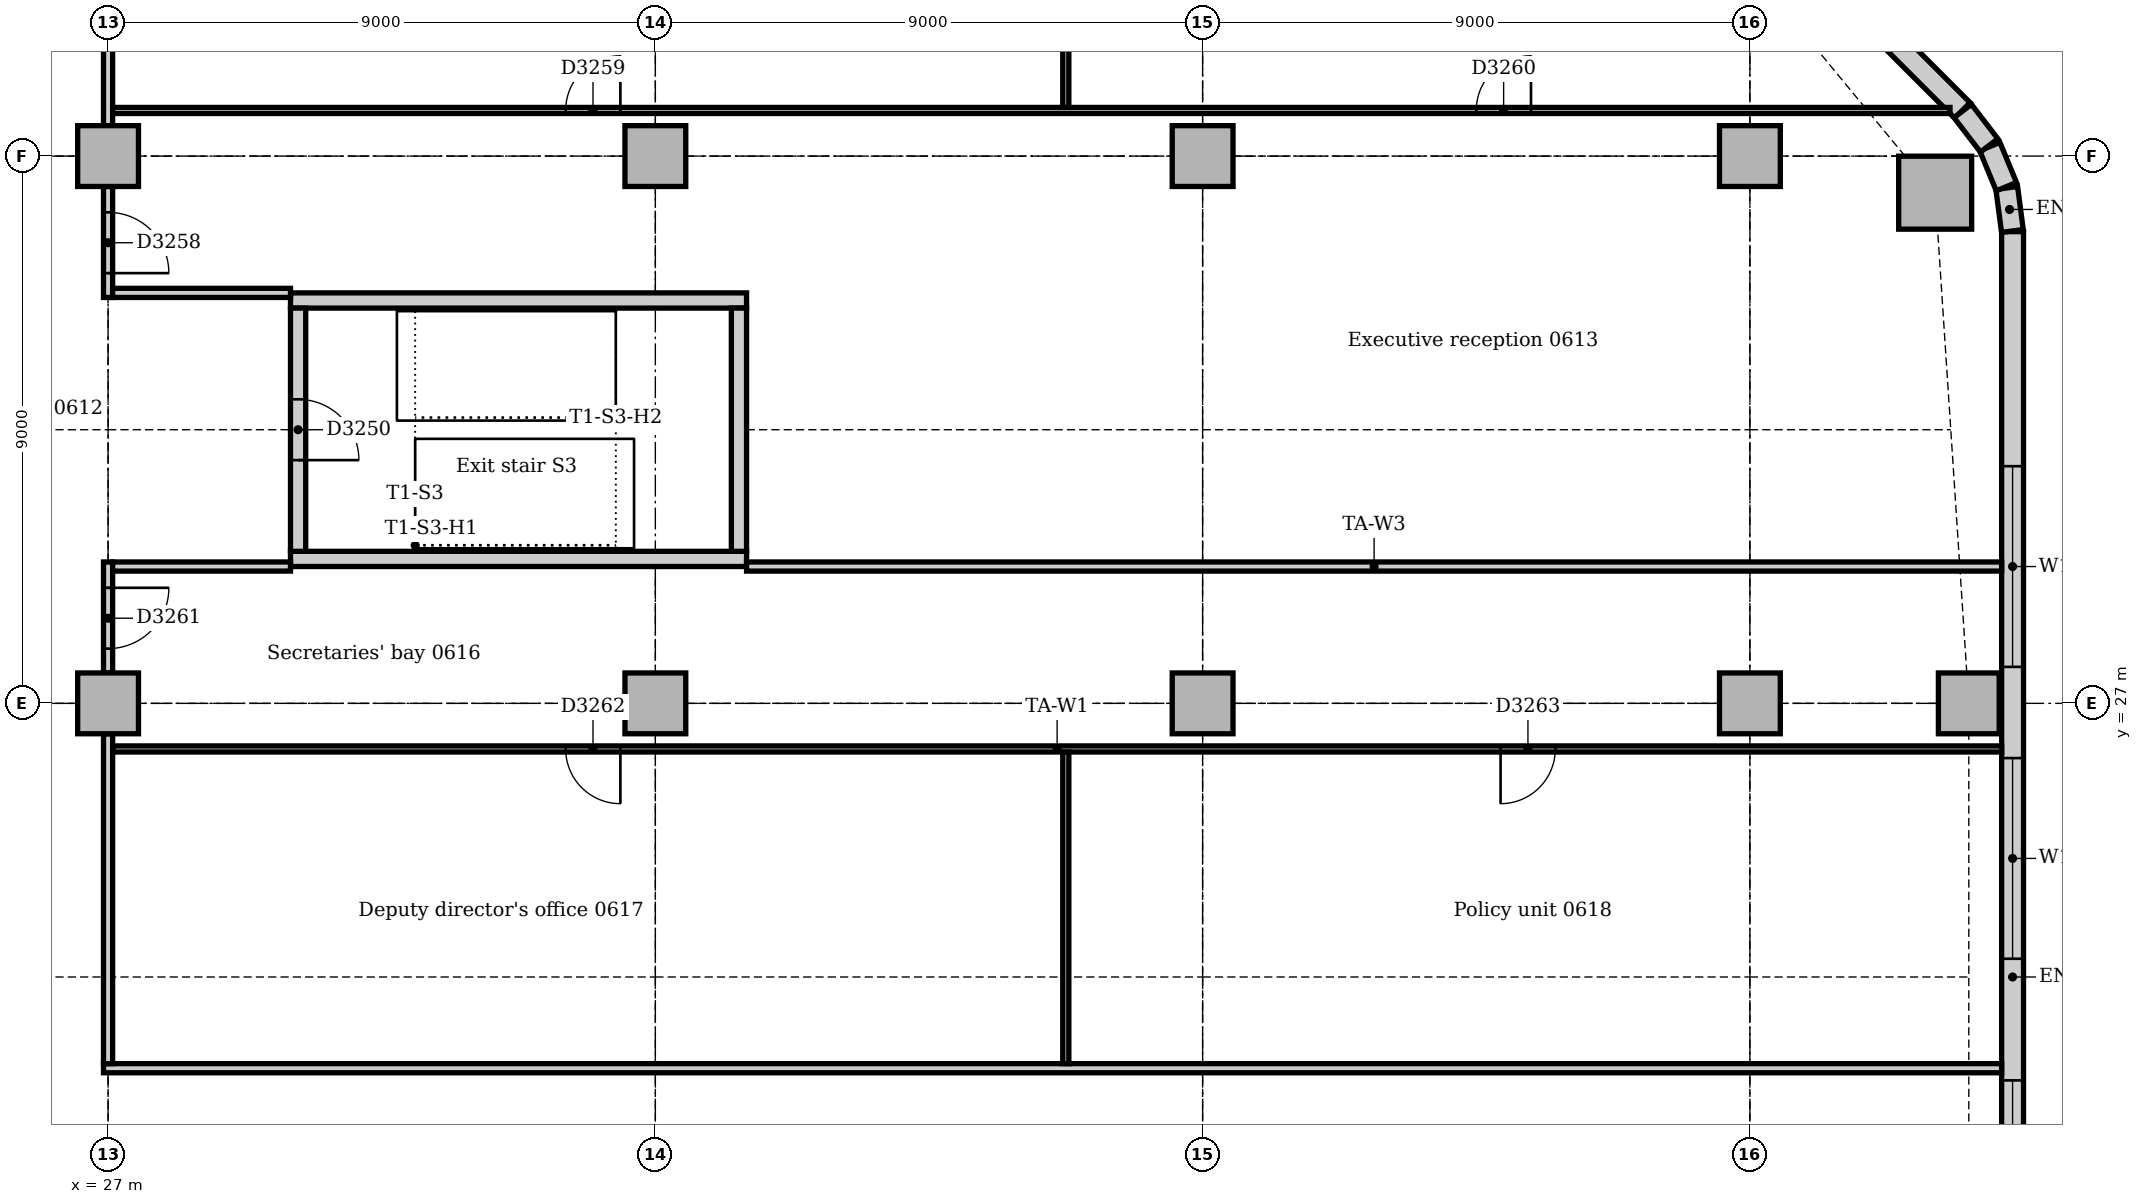
"""IFC4 building model, lengths in metres.
Left out: names, types, materials, properties, quantities, classifications, styles, units other than length and angle.
Written with IfcOpenShell. Run it as: python <this file> out.ifc"""

import sys

from ifc_helpers import new_model, si_unit, direction, frame, frame_2d, origin, origin_2d, place, context, subcontext, project, spatial, rectangle, extrude, element, fill, save


model = new_model("IFC4")
c1 = context("Model", 3, precision=1e-05, world=origin(), true_north=direction((0.0, 1.0)))
c2 = subcontext(c1, "Body", "Model", "MODEL_VIEW")
j1 = project(units=[si_unit("LENGTHUNIT", "METRE"), si_unit("PLANEANGLEUNIT", "RADIAN")], contexts=[c1])
p1 = place(None, origin())
s1 = spatial("IfcSite", under=j1, at=p1, CompositionType="ELEMENT")
p2 = place(p1, origin())
s2 = spatial("IfcBuilding", under=s1, at=p2, CompositionType="ELEMENT")
p3 = place(p2, frame((0.0, 0.0, 30.0)))
s3 = spatial("IfcBuildingStorey", under=s2, at=p3, CompositionType="ELEMENT", Elevation=30.0)
for number, where, z_axis, x_axis in (
    (1, (30.0, 29.375, 0.0), (0.0, 0.0, 1.0), (1.0, 0.0, 0.0)),
    (2, (37.5, 33.625, 0.0), (0.0, 0.0, 1.0), (-1.0, 0.0, 0.0)),
):
    element("IfcWall", number, at=place(p3, frame(where, z_axis=z_axis, x_axis=x_axis)), inside=s3, PredefinedType="SOLIDWALL", context=c2, shape_type="SweptSolid", body=[
        extrude(rectangle(XDim=7.5, YDim=0.25, at=frame_2d((3.75, 0.0))), origin(), (0.0, 0.0, 1.0), 4.0),
    ])
p4 = place(p3, frame((37.375, 29.5, 0.0), z_axis=(0.0, 0.0, 1.0), x_axis=(0.0, 1.0, 0.0)))
e3 = element("IfcWall", 3, at=p4, inside=s3, PredefinedType="SOLIDWALL", context=c2, shape_type="SweptSolid", body=[
    extrude(rectangle(XDim=4.0, YDim=0.25, at=frame_2d((2.0, 0.0))), origin(), (0.0, 0.0, 1.0), 4.0),
])
p5 = place(p3, frame((30.125, 33.5, 0.0), z_axis=(0.0, 0.0, 1.0), x_axis=(0.0, -1.0, 0.0)))
e4 = element("IfcWall", 4, at=p5, inside=s3, PredefinedType="SOLIDWALL", context=c2, shape_type="SweptSolid", body=[
    extrude(rectangle(XDim=4.0, YDim=0.25, at=frame_2d((2.0, 0.0))), origin(), (0.0, 0.0, 1.0), 4.0),
])
p6 = place(p5, frame((1.5, 0.0, 0.0)))
e5 = element("IfcOpeningElement", 5, at=p6, cuts=e4, PredefinedType="OPENING", context=c2, shape_type="SweptSolid", body=[
    extrude(rectangle(XDim=1.0, YDim=2.1, at=frame_2d((0.5, 1.05))), frame((0.0, 0.135, 0.0), z_axis=(0.0, -1.0, 0.0), x_axis=(1.0, 0.0, 0.0)), (0.0, 0.0, 1.0), 0.27),
])
p7 = place(p3, frame((57.047, 35.398, 0.0), z_axis=(0.0, 0.0, 1.0), x_axis=(1.0, 0.0, 0.0)))
e6 = element("IfcColumn", 6, at=p7, inside=s3, PredefinedType="COLUMN", context=c2, shape_type="SweptSolid", body=[
    extrude(rectangle(XDim=1.2, YDim=1.2, at=origin_2d()), origin(), (0.0, 0.0, 1.0), 3.85),
])
for number, where, z_axis, x_axis in (
    (7, (57.6, 27.0, 0.0), (0.0, 0.0, 1.0), (1.0, 0.0, 0.0)),
    (8, (27.0, 27.0, 0.0), (0.0, 0.0, 1.0), (1.0, 0.0, 0.0)),
    (9, (27.0, 36.0, 0.0), (0.0, 0.0, 1.0), (1.0, 0.0, 0.0)),
    (10, (36.0, 27.0, 0.0), (0.0, 0.0, 1.0), (1.0, 0.0, 0.0)),
    (11, (36.0, 36.0, 0.0), (0.0, 0.0, 1.0), (1.0, 0.0, 0.0)),
    (12, (45.0, 27.0, 0.0), (0.0, 0.0, 1.0), (1.0, 0.0, 0.0)),
    (13, (45.0, 36.0, 0.0), (0.0, 0.0, 1.0), (1.0, 0.0, 0.0)),
    (14, (54.0, 27.0, 0.0), (0.0, 0.0, 1.0), (1.0, 0.0, 0.0)),
    (15, (54.0, 36.0, 0.0), (0.0, 0.0, 1.0), (1.0, 0.0, 0.0)),
):
    element("IfcColumn", number, at=place(p3, frame(where, z_axis=z_axis, x_axis=x_axis)), inside=s3, PredefinedType="COLUMN", context=c2, shape_type="SweptSolid", body=[
        extrude(rectangle(XDim=1.0, YDim=1.0, at=origin_2d()), origin(), (0.0, 0.0, 1.0), 3.85),
    ])
p8 = place(p3, frame((58.32, 10.243, 0.0), z_axis=(0.0, 0.0, 1.0), x_axis=(0.0, 1.0, 0.0)))
e16 = element("IfcWall", 16, at=p8, inside=s3, PredefinedType="STANDARD", context=c2, shape_type="SweptSolid", body=[
    extrude(rectangle(XDim=24.515, YDim=0.36, at=frame_2d((12.257, 0.0))), origin(), (0.0, 0.0, 1.0), 3.85),
])
p9 = place(p8, frame((3.857, 0.0, 0.9)))
e17 = element("IfcOpeningElement", 17, at=p9, cuts=e16, PredefinedType="OPENING", context=c2, shape_type="SweptSolid", body=[
    extrude(rectangle(XDim=3.3, YDim=1.6, at=frame_2d((1.65, 0.8))), frame((0.0, 0.19, 0.0), z_axis=(0.0, -1.0, 0.0), x_axis=(1.0, 0.0, 0.0)), (0.0, 0.0, 1.0), 0.38),
])
p10 = place(p8, frame((8.757, 0.0, 0.9)))
e18 = element("IfcOpeningElement", 18, at=p10, cuts=e16, PredefinedType="OPENING", context=c2, shape_type="SweptSolid", body=[
    extrude(rectangle(XDim=1.8, YDim=1.6, at=frame_2d((0.9, 0.8))), frame((0.0, 0.19, 0.0), z_axis=(0.0, -1.0, 0.0), x_axis=(1.0, 0.0, 0.0)), (0.0, 0.0, 1.0), 0.38),
])
p11 = place(p8, frame((12.557, 0.0, 0.9)))
e19 = element("IfcOpeningElement", 19, at=p11, cuts=e16, PredefinedType="OPENING", context=c2, shape_type="SweptSolid", body=[
    extrude(rectangle(XDim=3.3, YDim=1.6, at=frame_2d((1.65, 0.8))), frame((0.0, 0.19, 0.0), z_axis=(0.0, -1.0, 0.0), x_axis=(1.0, 0.0, 0.0)), (0.0, 0.0, 1.0), 0.38),
])
p12 = place(p8, frame((17.357, 0.0, 0.9)))
e20 = element("IfcOpeningElement", 20, at=p12, cuts=e16, PredefinedType="OPENING", context=c2, shape_type="SweptSolid", body=[
    extrude(rectangle(XDim=3.3, YDim=1.6, at=frame_2d((1.65, 0.8))), frame((0.0, 0.19, 0.0), z_axis=(0.0, -1.0, 0.0), x_axis=(1.0, 0.0, 0.0)), (0.0, 0.0, 1.0), 0.38),
])
p13 = place(p3, frame((57.494, 36.751, 0.0), z_axis=(0.0, 0.0, 1.0), x_axis=(-0.707106781187, 0.707106781187, 0.0)))
e21 = element("IfcWall", 21, at=p13, inside=s3, PredefinedType="STANDARD", context=c2, shape_type="SweptSolid", body=[
    extrude(rectangle(XDim=10.243, YDim=0.36, at=frame_2d((5.121, 0.0))), origin(), (0.0, 0.0, 1.0), 3.85),
])
p14 = place(p13, frame((3.471, 0.0, 0.9)))
e22 = element("IfcOpeningElement", 22, at=p14, cuts=e21, PredefinedType="OPENING", context=c2, shape_type="SweptSolid", body=[
    extrude(rectangle(XDim=3.3, YDim=1.6, at=frame_2d((1.65, 0.8))), frame((0.0, 0.19, 0.0), z_axis=(0.0, -1.0, 0.0), x_axis=(1.0, 0.0, 0.0)), (0.0, 0.0, 1.0), 0.38),
])
for number, where, z_axis, x_axis in (
    (23, (58.317, 34.769, 0.0), (0.0, 0.0, 1.0), (-0.131, 0.991, 0.0)),
    (24, (58.218, 35.497, 0.0), (0.0, 0.0, 1.0), (-0.383, 0.924, 0.0)),
):
    element("IfcWall", number, at=place(p3, frame(where, z_axis=z_axis, x_axis=x_axis)), inside=s3, PredefinedType="STANDARD", context=c2, shape_type="SweptSolid", body=[
        extrude(rectangle(XDim=0.713, YDim=0.36, at=frame_2d((0.356, 0.0))), origin(), (0.0, 0.0, 1.0), 3.85),
    ])
p15 = place(p3, frame((57.934, 36.175, 0.0), z_axis=(0.0, 0.0, 1.0), x_axis=(-0.608802368033, 0.793321924995, 0.0)))
e25 = element("IfcWall", 25, at=p15, inside=s3, PredefinedType="STANDARD", context=c2, shape_type="SweptSolid", body=[
    extrude(rectangle(XDim=0.713, YDim=0.36, at=frame_2d((0.357, 0.0))), origin(), (0.0, 0.0, 1.0), 3.85),
])
p16 = place(p3, frame((26.925, 21.0, 0.0), z_axis=(0.0, 0.0, 1.0), x_axis=(1.0, 0.0, 0.0)))
e26 = element("IfcWall", 26, at=p16, inside=s3, PredefinedType="PARTITIONING", context=c2, shape_type="SweptSolid", body=[
    extrude(rectangle(XDim=31.215, YDim=0.15, at=frame_2d((15.607, 0.0))), origin(), (0.0, 0.0, 1.0), 3.85),
])
p17 = place(p3, frame((27.0, 33.675, 0.0), z_axis=(0.0, 0.0, 1.0), x_axis=(0.0, 1.0, 0.0)))
e27 = element("IfcWall", 27, at=p17, inside=s3, PredefinedType="PARTITIONING", context=c2, shape_type="SweptSolid", body=[
    extrude(rectangle(XDim=1.825, YDim=0.15, at=frame_2d((0.912, 0.0))), origin(), (0.0, 0.0, 1.0), 3.158),
])
p18 = place(p17, frame((0.4, 0.0, 0.0)))
e28 = element("IfcOpeningElement", 28, at=p18, cuts=e27, PredefinedType="OPENING", context=c2, shape_type="SweptSolid", body=[
    extrude(rectangle(XDim=1.0, YDim=2.1, at=frame_2d((0.5, 1.05))), frame((0.0, 0.085, 0.0), z_axis=(0.0, -1.0, 0.0), x_axis=(1.0, 0.0, 0.0)), (0.0, 0.0, 1.0), 0.17),
])
p19 = place(p3, frame((27.0, 36.5, 0.0), z_axis=(0.0, 0.0, 1.0), x_axis=(0.0, 1.0, 0.0)))
e29 = element("IfcWall", 29, at=p19, inside=s3, PredefinedType="PARTITIONING", context=c2, shape_type="SweptSolid", body=[
    extrude(rectangle(XDim=7.1, YDim=0.15, at=frame_2d((3.55, 0.0))), origin(), (0.0, 0.0, 1.0), 3.158),
])
p20 = place(p3, frame((27.0, 21.075, 0.0), z_axis=(0.0, 0.0, 1.0), x_axis=(0.0, 1.0, 0.0)))
e30 = element("IfcWall", 30, at=p20, inside=s3, PredefinedType="PARTITIONING", context=c2, shape_type="SweptSolid", body=[
    extrude(rectangle(XDim=5.425, YDim=0.15, at=frame_2d((2.712, 0.0))), origin(), (0.0, 0.0, 1.0), 3.158),
])
p21 = place(p3, frame((27.0, 27.5, 0.0), z_axis=(0.0, 0.0, 1.0), x_axis=(0.0, 1.0, 0.0)))
e31 = element("IfcWall", 31, at=p21, inside=s3, PredefinedType="PARTITIONING", context=c2, shape_type="SweptSolid", body=[
    extrude(rectangle(XDim=1.825, YDim=0.15, at=frame_2d((0.912, 0.0))), origin(), (0.0, 0.0, 1.0), 3.158),
])
p22 = place(p21, frame((0.4, 0.0, 0.0)))
e32 = element("IfcOpeningElement", 32, at=p22, cuts=e31, PredefinedType="OPENING", context=c2, shape_type="SweptSolid", body=[
    extrude(rectangle(XDim=1.0, YDim=2.1, at=frame_2d((0.5, 1.05))), frame((0.0, 0.085, 0.0), z_axis=(0.0, -1.0, 0.0), x_axis=(1.0, 0.0, 0.0)), (0.0, 0.0, 1.0), 0.17),
])
for number, where, z_axis, x_axis in (
    (33, (27.075, 29.25, 0.0), (0.0, 0.0, 1.0), (1.0, 0.0, 0.0)),
    (34, (27.075, 33.75, 0.0), (0.0, 0.0, 1.0), (1.0, 0.0, 0.0)),
):
    element("IfcWall", number, at=place(p3, frame(where, z_axis=z_axis, x_axis=x_axis)), inside=s3, PredefinedType="PARTITIONING", context=c2, shape_type="SweptSolid", body=[
        extrude(rectangle(XDim=2.925, YDim=0.15, at=frame_2d((1.462, 0.0))), origin(), (0.0, 0.0, 1.0), 3.85),
    ])
p23 = place(p3, frame((37.5, 29.25, 0.0), z_axis=(0.0, 0.0, 1.0), x_axis=(1.0, 0.0, 0.0)))
e35 = element("IfcWall", 35, at=p23, inside=s3, PredefinedType="PARTITIONING", context=c2, shape_type="SweptSolid", body=[
    extrude(rectangle(XDim=20.64, YDim=0.15, at=frame_2d((10.32, 0.0))), origin(), (0.0, 0.0, 1.0), 3.85),
])
p24 = place(p3, frame((27.075, 26.25, 0.0), z_axis=(0.0, 0.0, 1.0), x_axis=(1.0, 0.0, 0.0)))
e36 = element("IfcWall", 36, at=p24, inside=s3, PredefinedType="PARTITIONING", context=c2, shape_type="SweptSolid", body=[
    extrude(rectangle(XDim=31.065, YDim=0.1, at=frame_2d((15.533, 0.0))), origin(), (0.0, 0.0, 1.0), 3.85),
])
p25 = place(p24, frame((7.45, 0.0, 0.0)))
e37 = element("IfcOpeningElement", 37, at=p25, cuts=e36, PredefinedType="OPENING", context=c2, shape_type="SweptSolid", body=[
    extrude(rectangle(XDim=0.9, YDim=2.1, at=frame_2d((0.45, 1.05))), frame((0.0, 0.06, 0.0), z_axis=(0.0, -1.0, 0.0), x_axis=(1.0, 0.0, 0.0)), (0.0, 0.0, 1.0), 0.12),
])
p26 = place(p24, frame((22.825, 0.0, 0.0)))
e38 = element("IfcOpeningElement", 38, at=p26, cuts=e36, PredefinedType="OPENING", context=c2, shape_type="SweptSolid", body=[
    extrude(rectangle(XDim=0.9, YDim=2.1, at=frame_2d((0.45, 1.05))), frame((0.0, 0.06, 0.0), z_axis=(0.0, -1.0, 0.0), x_axis=(1.0, 0.0, 0.0)), (0.0, 0.0, 1.0), 0.12),
])
p27 = place(p3, frame((27.075, 36.75, 0.0), z_axis=(0.0, 0.0, 1.0), x_axis=(1.0, 0.0, 0.0)))
e39 = element("IfcWall", 39, at=p27, inside=s3, PredefinedType="PARTITIONING", context=c2, shape_type="SweptSolid", body=[
    extrude(rectangle(XDim=30.216, YDim=0.1, at=frame_2d((15.108, 0.0))), origin(), (0.0, 0.0, 1.0), 3.85),
])
p28 = place(p27, frame((7.45, 0.0, 0.0)))
e40 = element("IfcOpeningElement", 40, at=p28, cuts=e39, PredefinedType="OPENING", context=c2, shape_type="SweptSolid", body=[
    extrude(rectangle(XDim=0.9, YDim=2.1, at=frame_2d((0.45, 1.05))), frame((0.0, 0.06, 0.0), z_axis=(0.0, -1.0, 0.0), x_axis=(1.0, 0.0, 0.0)), (0.0, 0.0, 1.0), 0.12),
])
p29 = place(p27, frame((22.425, 0.0, 0.0)))
e41 = element("IfcOpeningElement", 41, at=p29, cuts=e39, PredefinedType="OPENING", context=c2, shape_type="SweptSolid", body=[
    extrude(rectangle(XDim=0.9, YDim=2.1, at=frame_2d((0.45, 1.05))), frame((0.0, 0.06, 0.0), z_axis=(0.0, -1.0, 0.0), x_axis=(1.0, 0.0, 0.0)), (0.0, 0.0, 1.0), 0.12),
])
p30 = place(p3, frame((42.75, 36.8, 0.0), z_axis=(0.0, 0.0, 1.0), x_axis=(0.0, 1.0, 0.0)))
e42 = element("IfcWall", 42, at=p30, inside=s3, PredefinedType="PARTITIONING", context=c2, shape_type="SweptSolid", body=[
    extrude(rectangle(XDim=7.84, YDim=0.1, at=frame_2d((3.92, 0.0))), origin(), (0.0, 0.0, 1.0), 3.85),
])
p31 = place(p3, frame((42.75, 21.075, 0.0), z_axis=(0.0, 0.0, 1.0), x_axis=(0.0, 1.0, 0.0)))
e43 = element("IfcWall", 43, at=p31, inside=s3, PredefinedType="PARTITIONING", context=c2, shape_type="SweptSolid", body=[
    extrude(rectangle(XDim=5.125, YDim=0.1, at=frame_2d((2.562, 0.0))), origin(), (0.0, 0.0, 1.0), 3.85),
])
p32 = place(p10, origin())
e44 = element("IfcWindow", 44, at=p32, inside=s3, PartitioningType="SINGLE_PANEL", PredefinedType="WINDOW", context=c2, shape_type="SweptSolid", body=[
    extrude(rectangle(XDim=1.8, YDim=1.6, at=frame_2d((0.9, 0.8))), frame((0.0, 0.13, 0.0), z_axis=(0.0, -1.0, 0.0), x_axis=(1.0, 0.0, 0.0)), (0.0, 0.0, 1.0), 0.06),
])
fill(e18, e44)
p33 = place(p11, origin())
e45 = element("IfcWindow", 45, at=p33, inside=s3, PartitioningType="SINGLE_PANEL", PredefinedType="WINDOW", context=c2, shape_type="SweptSolid", body=[
    extrude(rectangle(XDim=3.3, YDim=1.6, at=frame_2d((1.65, 0.8))), frame((0.0, 0.13, 0.0), z_axis=(0.0, -1.0, 0.0), x_axis=(1.0, 0.0, 0.0)), (0.0, 0.0, 1.0), 0.06),
])
fill(e19, e45)
p34 = place(p12, origin())
e46 = element("IfcWindow", 46, at=p34, inside=s3, PartitioningType="SINGLE_PANEL", PredefinedType="WINDOW", context=c2, shape_type="SweptSolid", body=[
    extrude(rectangle(XDim=3.3, YDim=1.6, at=frame_2d((1.65, 0.8))), frame((0.0, 0.13, 0.0), z_axis=(0.0, -1.0, 0.0), x_axis=(1.0, 0.0, 0.0)), (0.0, 0.0, 1.0), 0.06),
])
fill(e20, e46)
p35 = place(p6, origin())
e47 = element("IfcDoor", 47, at=p35, inside=s3, OperationType="SINGLE_SWING_RIGHT", PredefinedType="DOOR", context=c2, shape_type="SweptSolid", body=[
    extrude(rectangle(XDim=1.0, YDim=2.1, at=frame_2d((0.5, 1.05))), frame((0.0, 0.025, 0.0), z_axis=(0.0, -1.0, 0.0), x_axis=(1.0, 0.0, 0.0)), (0.0, 0.0, 1.0), 0.05),
])
fill(e5, e47)
p36 = place(p18, frame((1.0, 0.0, 0.0), z_axis=(0.0, 0.0, 1.0), x_axis=(-1.0, 0.0, 0.0)))
e48 = element("IfcDoor", 48, at=p36, inside=s3, OperationType="SINGLE_SWING_RIGHT", PredefinedType="DOOR", context=c2, shape_type="SweptSolid", body=[
    extrude(rectangle(XDim=1.0, YDim=2.1, at=frame_2d((0.5, 1.05))), frame((0.0, 0.025, 0.0), z_axis=(0.0, -1.0, 0.0), x_axis=(1.0, 0.0, 0.0)), (0.0, 0.0, 1.0), 0.05),
])
fill(e28, e48)
p37 = place(p28, origin())
e49 = element("IfcDoor", 49, at=p37, inside=s3, OperationType="SINGLE_SWING_RIGHT", PredefinedType="DOOR", context=c2, shape_type="SweptSolid", body=[
    extrude(rectangle(XDim=0.9, YDim=2.1, at=frame_2d((0.45, 1.05))), frame((0.0, 0.025, 0.0), z_axis=(0.0, -1.0, 0.0), x_axis=(1.0, 0.0, 0.0)), (0.0, 0.0, 1.0), 0.05),
])
fill(e40, e49)
p38 = place(p29, origin())
e50 = element("IfcDoor", 50, at=p38, inside=s3, OperationType="SINGLE_SWING_RIGHT", PredefinedType="DOOR", context=c2, shape_type="SweptSolid", body=[
    extrude(rectangle(XDim=0.9, YDim=2.1, at=frame_2d((0.45, 1.05))), frame((0.0, 0.025, 0.0), z_axis=(0.0, -1.0, 0.0), x_axis=(1.0, 0.0, 0.0)), (0.0, 0.0, 1.0), 0.05),
])
fill(e41, e50)
p39 = place(p22, frame((1.0, 0.0, 0.0), z_axis=(0.0, 0.0, 1.0), x_axis=(-1.0, 0.0, 0.0)))
e51 = element("IfcDoor", 51, at=p39, inside=s3, OperationType="SINGLE_SWING_LEFT", PredefinedType="DOOR", context=c2, shape_type="SweptSolid", body=[
    extrude(rectangle(XDim=1.0, YDim=2.1, at=frame_2d((0.5, 1.05))), frame((0.0, 0.025, 0.0), z_axis=(0.0, -1.0, 0.0), x_axis=(1.0, 0.0, 0.0)), (0.0, 0.0, 1.0), 0.05),
])
fill(e32, e51)
p40 = place(p25, frame((0.9, 0.0, 0.0), z_axis=(0.0, 0.0, 1.0), x_axis=(-1.0, 0.0, 0.0)))
e52 = element("IfcDoor", 52, at=p40, inside=s3, OperationType="SINGLE_SWING_LEFT", PredefinedType="DOOR", context=c2, shape_type="SweptSolid", body=[
    extrude(rectangle(XDim=0.9, YDim=2.1, at=frame_2d((0.45, 1.05))), frame((0.0, 0.025, 0.0), z_axis=(0.0, -1.0, 0.0), x_axis=(1.0, 0.0, 0.0)), (0.0, 0.0, 1.0), 0.05),
])
fill(e37, e52)
p41 = place(p26, frame((0.9, 0.0, 0.0), z_axis=(0.0, 0.0, 1.0), x_axis=(-1.0, 0.0, 0.0)))
e53 = element("IfcDoor", 53, at=p41, inside=s3, OperationType="SINGLE_SWING_RIGHT", PredefinedType="DOOR", context=c2, shape_type="SweptSolid", body=[
    extrude(rectangle(XDim=0.9, YDim=2.1, at=frame_2d((0.45, 1.05))), frame((0.0, 0.025, 0.0), z_axis=(0.0, -1.0, 0.0), x_axis=(1.0, 0.0, 0.0)), (0.0, 0.0, 1.0), 0.05),
])
fill(e38, e53)
save(model, sys.argv[1])
